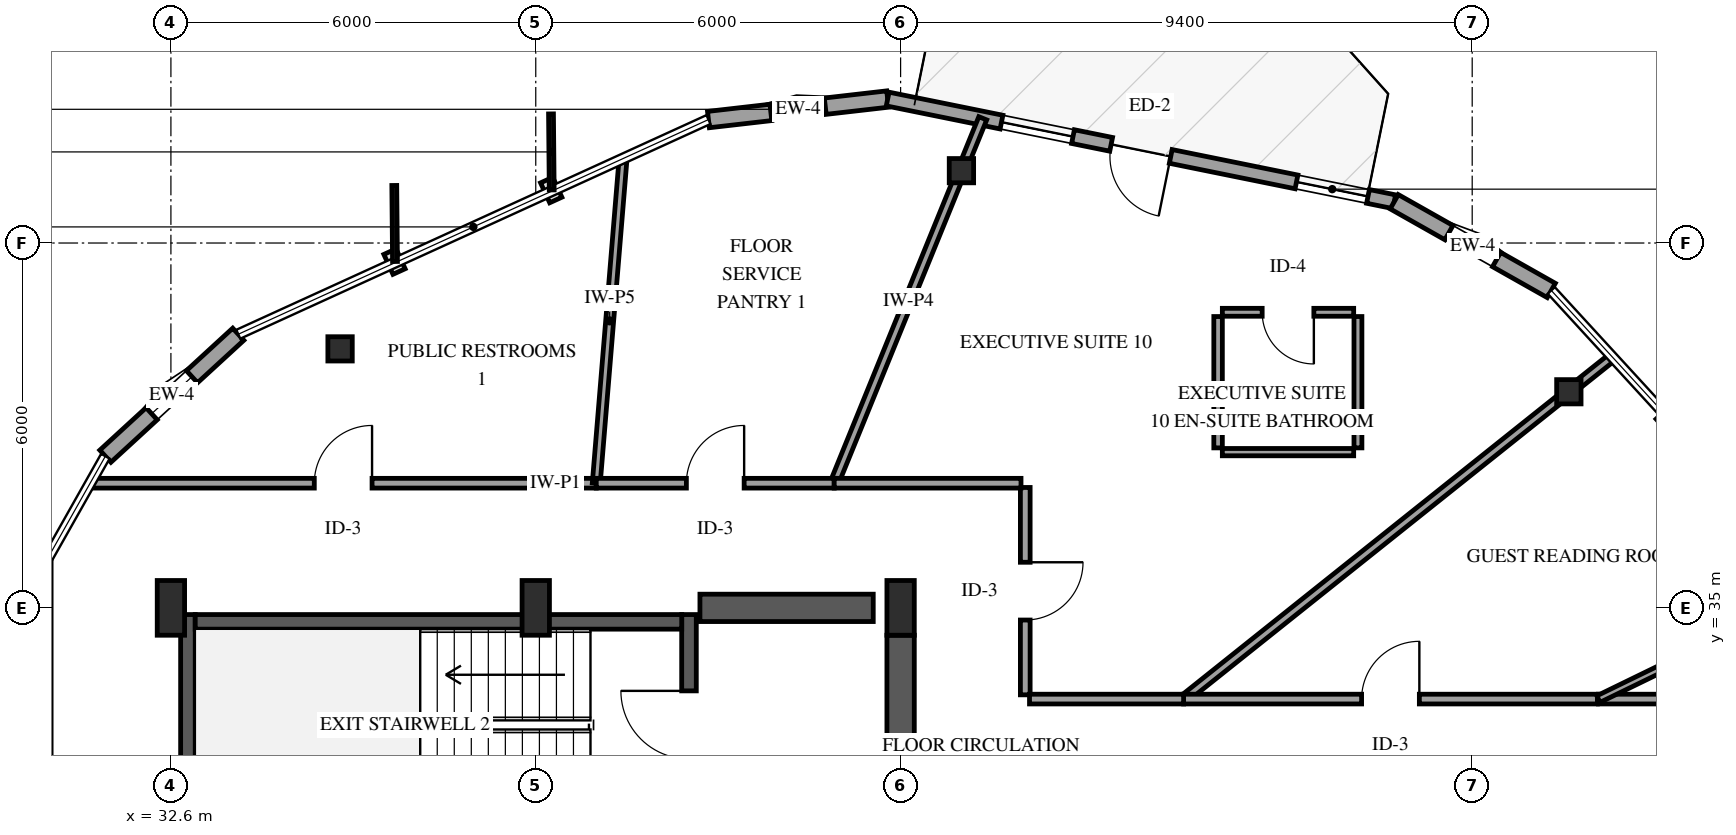
"""IFC4 building model, lengths in metres.
Left out: names, types, materials, properties, quantities, classifications, styles, units other than length and angle.
Written with IfcOpenShell. Run it as: python <this file> out.ifc"""

import sys

from ifc_helpers import new_model, si_unit, direction, frame, frame_2d, origin, origin_2d, place, context, subcontext, project, spatial, rectangle, i_section, extrude, element, fill, save


model = new_model("IFC4")
c1 = context("Model", 3, precision=1e-05, world=origin(), true_north=direction((0.0, 1.0)))
c2 = subcontext(c1, "Body", "Model", "MODEL_VIEW")
j1 = project(units=[si_unit("LENGTHUNIT", "METRE"), si_unit("PLANEANGLEUNIT", "RADIAN")], contexts=[c1])
p1 = place(None, origin())
s1 = spatial("IfcSite", under=j1, at=p1, CompositionType="ELEMENT")
p2 = place(p1, origin())
s2 = spatial("IfcBuilding", under=s1, at=p2, CompositionType="ELEMENT")
p3 = place(p2, frame((0.0, 0.0, 261.25)))
s3 = spatial("IfcBuildingStorey", under=s2, at=p3, CompositionType="ELEMENT", Elevation=261.25)
p4 = place(p3, frame((32.88, 31.26, 0.0), z_axis=(0.0, 0.0, 1.0), x_axis=(0.0, 1.0, 0.0)))
e1 = element("IfcWall", 1, at=p4, inside=s3, PredefinedType="SHEAR", context=c2, shape_type="SweptSolid", body=[
    extrude(rectangle(XDim=3.63, YDim=0.24, at=frame_2d((1.815, 0.0))), origin(), (0.0, 0.0, 1.0), 3.75),
])
p5 = place(p3, frame((41.12, 31.26, 0.0), z_axis=(0.0, 0.0, 1.0), x_axis=(0.0, 1.0, 0.0)))
e2 = element("IfcWall", 2, at=p5, inside=s3, PredefinedType="SHEAR", context=c2, shape_type="SweptSolid", body=[
    extrude(rectangle(XDim=3.63, YDim=0.24, at=frame_2d((1.815, 0.0))), origin(), (0.0, 0.0, 1.0), 3.75),
])
p6 = place(p5, frame((1.255, 0.0, 0.0)))
e3 = element("IfcOpeningElement", 3, at=p6, cuts=e2, PredefinedType="OPENING", context=c2, shape_type="SweptSolid", body=[
    extrude(rectangle(XDim=1.12, YDim=2.15, at=frame_2d((0.56, 1.075))), frame((0.0, 0.13, 0.0), z_axis=(0.0, -1.0, 0.0), x_axis=(1.0, 0.0, 0.0)), (0.0, 0.0, 1.0), 0.26),
])
p7 = place(p3, frame((33.0, 34.77, 0.0), z_axis=(0.0, 0.0, 1.0), x_axis=(1.0, 0.0, 0.0)))
e4 = element("IfcWall", 4, at=p7, inside=s3, PredefinedType="SHEAR", context=c2, shape_type="SweptSolid", body=[
    extrude(rectangle(XDim=8.0, YDim=0.24, at=frame_2d((4.0, 0.0))), origin(), (0.0, 0.0, 1.0), 3.75),
])
p8 = place(p3, frame((41.3, 35.0, 0.0), z_axis=(0.0, 0.0, 1.0), x_axis=(1.0, 0.0, 0.0)))
e5 = element("IfcWall", 5, at=p8, inside=s3, PredefinedType="SHEAR", context=c2, shape_type="SweptSolid", body=[
    extrude(rectangle(XDim=2.85, YDim=0.45, at=frame_2d((1.425, 0.0))), origin(), (0.0, 0.0, 1.0), 3.75),
])
p9 = place(p3, frame((44.6, 29.8, 0.0), z_axis=(0.0, 0.0, 1.0), x_axis=(0.0, 1.0, 0.0)))
e6 = element("IfcWall", 6, at=p9, inside=s3, PredefinedType="SHEAR", context=c2, shape_type="SweptSolid", body=[
    extrude(rectangle(XDim=4.75, YDim=0.45, at=frame_2d((2.375, 0.0))), origin(), (0.0, 0.0, 1.0), 3.75),
])
for number, where, z_axis, x_axis in (
    (7, (32.6, 35.0, 0.0), (0.0, 0.0, 1.0), (1.0, 0.0, 0.0)),
    (8, (38.6, 35.0, 0.0), (0.0, 0.0, 1.0), (1.0, 0.0, 0.0)),
    (9, (44.6, 35.0, 0.0), (0.0, 0.0, 1.0), (1.0, 0.0, 0.0)),
):
    element("IfcColumn", number, at=place(p3, frame(where, z_axis=z_axis, x_axis=x_axis)), inside=s3, PredefinedType="PILASTER", context=c2, shape_type="SweptSolid", body=[
        extrude(rectangle(XDim=0.45, YDim=0.9, at=origin_2d()), origin(), (0.0, 0.0, 1.0), 3.75),
    ])
for number, where, z_axis, x_axis in (
    (10, (55.589, 38.554, 0.0), (0.0, 0.0, 1.0), (1.0, 0.0, 0.0)),
    (11, (45.6, 42.189, 0.0), (0.0, 0.0, 1.0), (1.0, 0.0, 0.0)),
    (12, (35.382, 39.26, 0.0), (0.0, 0.0, 1.0), (1.0, 0.0, 0.0)),
):
    element("IfcColumn", number, at=place(p3, frame(where, z_axis=z_axis, x_axis=x_axis)), inside=s3, PredefinedType="COLUMN", context=c2, shape_type="SweptSolid", body=[
        extrude(i_section(OverallWidth=0.401, OverallDepth=0.399, WebThickness=0.025, FlangeThickness=0.04, FilletRadius=0.038, at=origin_2d()), origin(), (0.0, 0.0, 1.0), 3.75),
    ])
p10 = place(p3, frame((44.387, 43.368, 0.0), z_axis=(0.0, 0.0, 1.0), x_axis=(-0.993482974501, -0.113980609649, 0.0)))
e13 = element("IfcWall", 13, at=p10, inside=s3, PredefinedType="SOLIDWALL", context=c2, shape_type="SweptSolid", body=[
    extrude(rectangle(XDim=2.967, YDim=0.27, at=frame_2d((1.483, 0.0))), origin(), (0.0, 0.0, 1.0), 2.829),
])
p11 = place(p10, frame((1.033, 0.0, 0.75)))
e14 = element("IfcOpeningElement", 14, at=p11, cuts=e13, PredefinedType="OPENING", context=c2, shape_type="SweptSolid", body=[
    extrude(rectangle(XDim=0.9, YDim=1.5, at=frame_2d((0.45, 0.75))), frame((0.0, 0.145, 0.0), z_axis=(0.0, -1.0, 0.0), x_axis=(1.0, 0.0, 0.0)), (0.0, 0.0, 1.0), 0.29),
])
p12 = place(p3, frame((52.718, 41.679, 0.0), z_axis=(0.0, 0.0, 1.0), x_axis=(-0.980059134028, 0.198706048744, 0.0)))
e15 = element("IfcWall", 15, at=p12, inside=s3, PredefinedType="SOLIDWALL", context=c2, shape_type="SweptSolid", body=[
    extrude(rectangle(XDim=8.5, YDim=0.23, at=frame_2d((4.25, 0.0))), origin(), (0.0, 0.0, 1.0), 2.829),
])
p13 = place(p12, frame((3.75, 0.0, 0.0)))
e16 = element("IfcOpeningElement", 16, at=p13, cuts=e15, PredefinedType="OPENING", context=c2, shape_type="SweptSolid", body=[
    extrude(rectangle(XDim=1.0, YDim=2.15, at=frame_2d((0.5, 1.075))), frame((0.0, 0.125, 0.0), z_axis=(0.0, -1.0, 0.0), x_axis=(1.0, 0.0, 0.0)), (0.0, 0.0, 1.0), 0.25),
])
p14 = place(p12, frame((0.44, 0.0, 0.72)))
e17 = element("IfcOpeningElement", 17, at=p14, cuts=e15, PredefinedType="OPENING", context=c2, shape_type="SweptSolid", body=[
    extrude(rectangle(XDim=1.2, YDim=1.6, at=frame_2d((0.6, 0.8))), frame((0.0, 0.125, 0.0), z_axis=(0.0, -1.0, 0.0), x_axis=(1.0, 0.0, 0.0)), (0.0, 0.0, 1.0), 0.25),
])
p15 = place(p12, frame((5.39, 0.0, 0.72)))
e18 = element("IfcOpeningElement", 18, at=p15, cuts=e15, PredefinedType="OPENING", context=c2, shape_type="SweptSolid", body=[
    extrude(rectangle(XDim=1.2, YDim=1.6, at=frame_2d((0.6, 0.8))), frame((0.0, 0.125, 0.0), z_axis=(0.0, -1.0, 0.0), x_axis=(1.0, 0.0, 0.0)), (0.0, 0.0, 1.0), 0.25),
])
p16 = place(p3, frame((33.708, 39.5, 0.0), z_axis=(0.0, 0.0, 1.0), x_axis=(-0.736781684987, -0.676130718625, 0.0)))
e19 = element("IfcWall", 19, at=p16, inside=s3, PredefinedType="SOLIDWALL", context=c2, shape_type="SweptSolid", body=[
    extrude(rectangle(XDim=2.967, YDim=0.27, at=frame_2d((1.483, 0.0))), origin(), (0.0, 0.0, 1.0), 2.829),
])
p17 = place(p16, frame((1.033, 0.0, 0.75)))
e20 = element("IfcOpeningElement", 20, at=p17, cuts=e19, PredefinedType="OPENING", context=c2, shape_type="SweptSolid", body=[
    extrude(rectangle(XDim=0.9, YDim=1.5, at=frame_2d((0.45, 0.75))), frame((0.0, 0.145, 0.0), z_axis=(0.0, -1.0, 0.0), x_axis=(1.0, 0.0, 0.0)), (0.0, 0.0, 1.0), 0.29),
])
p18 = place(p3, frame((55.301, 40.22, 0.0), z_axis=(0.0, 0.0, 1.0), x_axis=(-0.870703816421, 0.491807751128, 0.0)))
e21 = element("IfcWall", 21, at=p18, inside=s3, PredefinedType="SOLIDWALL", context=c2, shape_type="SweptSolid", body=[
    extrude(rectangle(XDim=2.967, YDim=0.27, at=frame_2d((1.483, 0.0))), origin(), (0.0, 0.0, 1.0), 2.829),
])
p19 = place(p18, frame((1.033, 0.0, 0.75)))
e22 = element("IfcOpeningElement", 22, at=p19, cuts=e21, PredefinedType="OPENING", context=c2, shape_type="SweptSolid", body=[
    extrude(rectangle(XDim=0.9, YDim=1.5, at=frame_2d((0.45, 0.75))), frame((0.0, 0.145, 0.0), z_axis=(0.0, -1.0, 0.0), x_axis=(1.0, 0.0, 0.0)), (0.0, 0.0, 1.0), 0.29),
])
p20 = place(p3, frame((49.254, 33.5, 0.0), z_axis=(0.0, 0.0, 1.0), x_axis=(0.781723660119, 0.623624982831, 0.0)))
e23 = element("IfcWall", 23, at=p20, inside=s3, PredefinedType="PARTITIONING", context=c2, shape_type="SweptSolid", body=[
    extrude(rectangle(XDim=9.02, YDim=0.14, at=frame_2d((4.51, 0.0))), origin(), (0.0, 0.0, 1.0), 3.45),
])
p21 = place(p3, frame((31.271, 37.05, 0.0), z_axis=(0.0, 0.0, 1.0), x_axis=(1.0, 0.0, 0.0)))
e24 = element("IfcWall", 24, at=p21, inside=s3, PredefinedType="PARTITIONING", context=c2, shape_type="SweptSolid", body=[
    extrude(rectangle(XDim=8.324, YDim=0.16, at=frame_2d((4.162, 0.0))), origin(), (0.0, 0.0, 1.0), 3.45),
])
p22 = place(p21, frame((3.687, 0.0, 0.0)))
e25 = element("IfcOpeningElement", 25, at=p22, cuts=e24, PredefinedType="OPENING", context=c2, shape_type="SweptSolid", body=[
    extrude(rectangle(XDim=0.95, YDim=2.15, at=frame_2d((0.475, 1.075))), frame((0.0, 0.09, 0.0), z_axis=(0.0, -1.0, 0.0), x_axis=(1.0, 0.0, 0.0)), (0.0, 0.0, 1.0), 0.18),
])
p23 = place(p3, frame((49.254, 33.5, 0.0), z_axis=(0.0, 0.0, 1.0), x_axis=(1.0, 0.0, 0.0)))
e26 = element("IfcWall", 26, at=p23, inside=s3, PredefinedType="PARTITIONING", context=c2, shape_type="SweptSolid", body=[
    extrude(rectangle(XDim=6.805, YDim=0.16, at=frame_2d((3.403, 0.0))), origin(), (0.0, 0.0, 1.0), 3.45),
])
p24 = place(p23, frame((2.927, 0.0, 0.0)))
e27 = element("IfcOpeningElement", 27, at=p24, cuts=e26, PredefinedType="OPENING", context=c2, shape_type="SweptSolid", body=[
    extrude(rectangle(XDim=0.95, YDim=2.15, at=frame_2d((0.475, 1.075))), frame((0.0, 0.09, 0.0), z_axis=(0.0, -1.0, 0.0), x_axis=(1.0, 0.0, 0.0)), (0.0, 0.0, 1.0), 0.18),
])
p25 = place(p3, frame((43.508, 37.05, 0.0), z_axis=(0.0, 0.0, 1.0), x_axis=(0.377035942595, 0.926198627721, 0.0)))
e28 = element("IfcWall", 28, at=p25, inside=s3, PredefinedType="PARTITIONING", context=c2, shape_type="SweptSolid", body=[
    extrude(rectangle(XDim=6.479, YDim=0.14, at=frame_2d((3.24, 0.0))), origin(), (0.0, 0.0, 1.0), 2.745),
])
p26 = place(p3, frame((39.595, 37.05, 0.0), z_axis=(0.0, 0.0, 1.0), x_axis=(0.082306219111, 0.996607087219, 0.0)))
e29 = element("IfcWall", 29, at=p26, inside=s3, PredefinedType="PARTITIONING", context=c2, shape_type="SweptSolid", body=[
    extrude(rectangle(XDim=5.357, YDim=0.13, at=frame_2d((2.678, 0.0))), origin(), (0.0, 0.0, 1.0), 3.45),
])
p27 = place(p3, frame((56.076, 33.5, 0.0), z_axis=(0.0, 0.0, 1.0), x_axis=(1.0, 0.0, 0.0)))
e30 = element("IfcWall", 30, at=p27, inside=s3, PredefinedType="PARTITIONING", context=c2, shape_type="SweptSolid", body=[
    extrude(rectangle(XDim=5.275, YDim=0.16, at=frame_2d((2.638, 0.0))), origin(), (0.0, 0.0, 1.0), 3.45),
])
p28 = place(p27, frame((2.162, 0.0, 0.0)))
e31 = element("IfcOpeningElement", 31, at=p28, cuts=e30, PredefinedType="OPENING", context=c2, shape_type="SweptSolid", body=[
    extrude(rectangle(XDim=0.95, YDim=2.15, at=frame_2d((0.475, 1.075))), frame((0.0, 0.09, 0.0), z_axis=(0.0, -1.0, 0.0), x_axis=(1.0, 0.0, 0.0)), (0.0, 0.0, 1.0), 0.18),
])
p29 = place(p3, frame((56.076, 33.5, 0.0), z_axis=(0.0, 0.0, 1.0), x_axis=(0.899158676247, 0.437622754128, 0.0)))
e32 = element("IfcWall", 32, at=p29, inside=s3, PredefinedType="PARTITIONING", context=c2, shape_type="SweptSolid", body=[
    extrude(rectangle(XDim=4.145, YDim=0.12, at=frame_2d((2.073, 0.0))), origin(), (0.0, 0.0, 1.0), 3.45),
])
p30 = place(p3, frame((39.595, 37.05, 0.0), z_axis=(0.0, 0.0, 1.0), x_axis=(1.0, 0.0, 0.0)))
e33 = element("IfcWall", 33, at=p30, inside=s3, PredefinedType="PARTITIONING", context=c2, shape_type="SweptSolid", body=[
    extrude(rectangle(XDim=3.913, YDim=0.16, at=frame_2d((1.957, 0.0))), origin(), (0.0, 0.0, 1.0), 3.45),
])
p31 = place(p30, frame((1.482, 0.0, 0.0)))
e34 = element("IfcOpeningElement", 34, at=p31, cuts=e33, PredefinedType="OPENING", context=c2, shape_type="SweptSolid", body=[
    extrude(rectangle(XDim=0.95, YDim=2.15, at=frame_2d((0.475, 1.075))), frame((0.0, 0.09, 0.0), z_axis=(0.0, -1.0, 0.0), x_axis=(1.0, 0.0, 0.0)), (0.0, 0.0, 1.0), 0.18),
])
p32 = place(p3, frame((46.65, 36.98, 0.0), z_axis=(0.0, 0.0, 1.0), x_axis=(0.0, -1.0, 0.0)))
e35 = element("IfcWall", 35, at=p32, inside=s3, PredefinedType="PARTITIONING", context=c2, shape_type="SweptSolid", body=[
    extrude(rectangle(XDim=3.41, YDim=0.16, at=frame_2d((1.705, 0.0))), origin(), (0.0, 0.0, 1.0), 3.45),
])
p33 = place(p32, frame((1.23, 0.0, 0.0)))
e36 = element("IfcOpeningElement", 36, at=p33, cuts=e35, PredefinedType="OPENING", context=c2, shape_type="SweptSolid", body=[
    extrude(rectangle(XDim=0.95, YDim=2.15, at=frame_2d((0.475, 1.075))), frame((0.0, 0.09, 0.0), z_axis=(0.0, -1.0, 0.0), x_axis=(1.0, 0.0, 0.0)), (0.0, 0.0, 1.0), 0.18),
])
p34 = place(p3, frame((43.508, 37.05, 0.0), z_axis=(0.0, 0.0, 1.0), x_axis=(1.0, 0.0, 0.0)))
e37 = element("IfcWall", 37, at=p34, inside=s3, PredefinedType="PARTITIONING", context=c2, shape_type="SweptSolid", body=[
    extrude(rectangle(XDim=3.072, YDim=0.16, at=frame_2d((1.536, 0.0))), origin(), (0.0, 0.0, 1.0), 3.45),
])
p35 = place(p3, frame((46.72, 33.5, 0.0), z_axis=(0.0, 0.0, 1.0), x_axis=(1.0, 0.0, 0.0)))
e38 = element("IfcWall", 38, at=p35, inside=s3, PredefinedType="PARTITIONING", context=c2, shape_type="SweptSolid", body=[
    extrude(rectangle(XDim=2.534, YDim=0.16, at=frame_2d((1.267, 0.0))), origin(), (0.0, 0.0, 1.0), 3.45),
])
p36 = place(p3, frame((52.051, 39.861, 0.0), z_axis=(0.0, 0.0, 1.0), x_axis=(-1.0, 0.0, 0.0)))
e39 = element("IfcWall", 39, at=p36, inside=s3, PredefinedType="PARTITIONING", context=c2, shape_type="SweptSolid", body=[
    extrude(rectangle(XDim=2.16, YDim=0.13, at=frame_2d((1.08, 0.0))), origin(), (0.0, 0.0, 1.0), 3.45),
])
p37 = place(p36, frame((0.655, 0.0, 0.0)))
e40 = element("IfcOpeningElement", 40, at=p37, cuts=e39, PredefinedType="OPENING", context=c2, shape_type="SweptSolid", body=[
    extrude(rectangle(XDim=0.85, YDim=2.1, at=frame_2d((0.425, 1.05))), frame((0.0, 0.075, 0.0), z_axis=(0.0, -1.0, 0.0), x_axis=(1.0, 0.0, 0.0)), (0.0, 0.0, 1.0), 0.15),
])
p38 = place(p3, frame((49.891, 37.561, 0.0), z_axis=(0.0, 0.0, 1.0), x_axis=(1.0, 0.0, 0.0)))
e41 = element("IfcWall", 41, at=p38, inside=s3, PredefinedType="PARTITIONING", context=c2, shape_type="SweptSolid", body=[
    extrude(rectangle(XDim=2.16, YDim=0.12, at=frame_2d((1.08, 0.0))), origin(), (0.0, 0.0, 1.0), 3.45),
])
p39 = place(p3, frame((49.821, 39.791, 0.0), z_axis=(0.0, 0.0, 1.0), x_axis=(0.0, -1.0, 0.0)))
e42 = element("IfcWall", 42, at=p39, inside=s3, PredefinedType="PARTITIONING", context=c2, shape_type="SweptSolid", body=[
    extrude(rectangle(XDim=2.16, YDim=0.14, at=frame_2d((1.08, 0.0))), origin(), (0.0, 0.0, 1.0), 3.45),
])
p40 = place(p3, frame((52.121, 37.631, 0.0), z_axis=(0.0, 0.0, 1.0), x_axis=(0.0, 1.0, 0.0)))
e43 = element("IfcWall", 43, at=p40, inside=s3, PredefinedType="PARTITIONING", context=c2, shape_type="SweptSolid", body=[
    extrude(rectangle(XDim=2.16, YDim=0.13, at=frame_2d((1.08, 0.0))), origin(), (0.0, 0.0, 1.0), 3.45),
])
p41 = place(p11, origin())
e44 = element("IfcWindow", 44, at=p41, inside=s3, PartitioningType="SINGLE_PANEL", PredefinedType="WINDOW", context=c2, shape_type="SweptSolid", body=[
    extrude(rectangle(XDim=0.9, YDim=1.5, at=frame_2d((0.45, 0.75))), frame((0.0, 0.03, 0.0), z_axis=(0.0, -1.0, 0.0), x_axis=(1.0, 0.0, 0.0)), (0.0, 0.0, 1.0), 0.06),
])
fill(e14, e44)
p42 = place(p13, origin())
e45 = element("IfcDoor", 45, at=p42, inside=s3, OperationType="SINGLE_SWING_LEFT", PredefinedType="DOOR", context=c2, shape_type="SweptSolid", body=[
    extrude(rectangle(XDim=1.0, YDim=2.15, at=frame_2d((0.5, 1.075))), frame((0.0, 0.025, 0.0), z_axis=(0.0, -1.0, 0.0), x_axis=(1.0, 0.0, 0.0)), (0.0, 0.0, 1.0), 0.05),
])
fill(e16, e45)
p43 = place(p14, origin())
e46 = element("IfcWindow", 46, at=p43, inside=s3, PartitioningType="SINGLE_PANEL", PredefinedType="WINDOW", context=c2, shape_type="SweptSolid", body=[
    extrude(rectangle(XDim=1.2, YDim=1.6, at=frame_2d((0.6, 0.8))), frame((0.0, 0.03, 0.0), z_axis=(0.0, -1.0, 0.0), x_axis=(1.0, 0.0, 0.0)), (0.0, 0.0, 1.0), 0.06),
])
fill(e17, e46)
p44 = place(p15, origin())
e47 = element("IfcWindow", 47, at=p44, inside=s3, PartitioningType="SINGLE_PANEL", PredefinedType="WINDOW", context=c2, shape_type="SweptSolid", body=[
    extrude(rectangle(XDim=1.2, YDim=1.6, at=frame_2d((0.6, 0.8))), frame((0.0, 0.03, 0.0), z_axis=(0.0, -1.0, 0.0), x_axis=(1.0, 0.0, 0.0)), (0.0, 0.0, 1.0), 0.06),
])
fill(e18, e47)
p45 = place(p17, origin())
e48 = element("IfcWindow", 48, at=p45, inside=s3, PartitioningType="SINGLE_PANEL", PredefinedType="WINDOW", context=c2, shape_type="SweptSolid", body=[
    extrude(rectangle(XDim=0.9, YDim=1.5, at=frame_2d((0.45, 0.75))), frame((0.0, 0.03, 0.0), z_axis=(0.0, -1.0, 0.0), x_axis=(1.0, 0.0, 0.0)), (0.0, 0.0, 1.0), 0.06),
])
fill(e20, e48)
p46 = place(p19, origin())
e49 = element("IfcWindow", 49, at=p46, inside=s3, PartitioningType="SINGLE_PANEL", PredefinedType="WINDOW", context=c2, shape_type="SweptSolid", body=[
    extrude(rectangle(XDim=0.9, YDim=1.5, at=frame_2d((0.45, 0.75))), frame((0.0, 0.03, 0.0), z_axis=(0.0, -1.0, 0.0), x_axis=(1.0, 0.0, 0.0)), (0.0, 0.0, 1.0), 0.06),
])
fill(e22, e49)
p47 = place(p6, origin())
e50 = element("IfcDoor", 50, at=p47, inside=s3, OperationType="SINGLE_SWING_RIGHT", PredefinedType="DOOR", context=c2, shape_type="SweptSolid", body=[
    extrude(rectangle(XDim=1.12, YDim=2.15, at=frame_2d((0.56, 1.075))), frame((0.0, 0.025, 0.0), z_axis=(0.0, -1.0, 0.0), x_axis=(1.0, 0.0, 0.0)), (0.0, 0.0, 1.0), 0.05),
])
fill(e3, e50)
p48 = place(p22, origin())
e51 = element("IfcDoor", 51, at=p48, inside=s3, OperationType="SINGLE_SWING_RIGHT", PredefinedType="DOOR", context=c2, shape_type="SweptSolid", body=[
    extrude(rectangle(XDim=0.95, YDim=2.15, at=frame_2d((0.475, 1.075))), frame((0.0, 0.025, 0.0), z_axis=(0.0, -1.0, 0.0), x_axis=(1.0, 0.0, 0.0)), (0.0, 0.0, 1.0), 0.05),
])
fill(e25, e51)
p49 = place(p24, origin())
e52 = element("IfcDoor", 52, at=p49, inside=s3, OperationType="SINGLE_SWING_RIGHT", PredefinedType="DOOR", context=c2, shape_type="SweptSolid", body=[
    extrude(rectangle(XDim=0.95, YDim=2.15, at=frame_2d((0.475, 1.075))), frame((0.0, 0.025, 0.0), z_axis=(0.0, -1.0, 0.0), x_axis=(1.0, 0.0, 0.0)), (0.0, 0.0, 1.0), 0.05),
])
fill(e27, e52)
p50 = place(p31, origin())
e53 = element("IfcDoor", 53, at=p50, inside=s3, OperationType="SINGLE_SWING_RIGHT", PredefinedType="DOOR", context=c2, shape_type="SweptSolid", body=[
    extrude(rectangle(XDim=0.95, YDim=2.15, at=frame_2d((0.475, 1.075))), frame((0.0, 0.025, 0.0), z_axis=(0.0, -1.0, 0.0), x_axis=(1.0, 0.0, 0.0)), (0.0, 0.0, 1.0), 0.05),
])
fill(e34, e53)
p51 = place(p33, origin())
e54 = element("IfcDoor", 54, at=p51, inside=s3, OperationType="SINGLE_SWING_LEFT", PredefinedType="DOOR", context=c2, shape_type="SweptSolid", body=[
    extrude(rectangle(XDim=0.95, YDim=2.15, at=frame_2d((0.475, 1.075))), frame((0.0, 0.025, 0.0), z_axis=(0.0, -1.0, 0.0), x_axis=(1.0, 0.0, 0.0)), (0.0, 0.0, 1.0), 0.05),
])
fill(e36, e54)
p52 = place(p37, origin())
e55 = element("IfcDoor", 55, at=p52, inside=s3, OperationType="SINGLE_SWING_LEFT", PredefinedType="DOOR", context=c2, shape_type="SweptSolid", body=[
    extrude(rectangle(XDim=0.85, YDim=2.1, at=frame_2d((0.425, 1.05))), frame((0.0, 0.025, 0.0), z_axis=(0.0, -1.0, 0.0), x_axis=(1.0, 0.0, 0.0)), (0.0, 0.0, 1.0), 0.05),
])
fill(e40, e55)
save(model, sys.argv[1])
